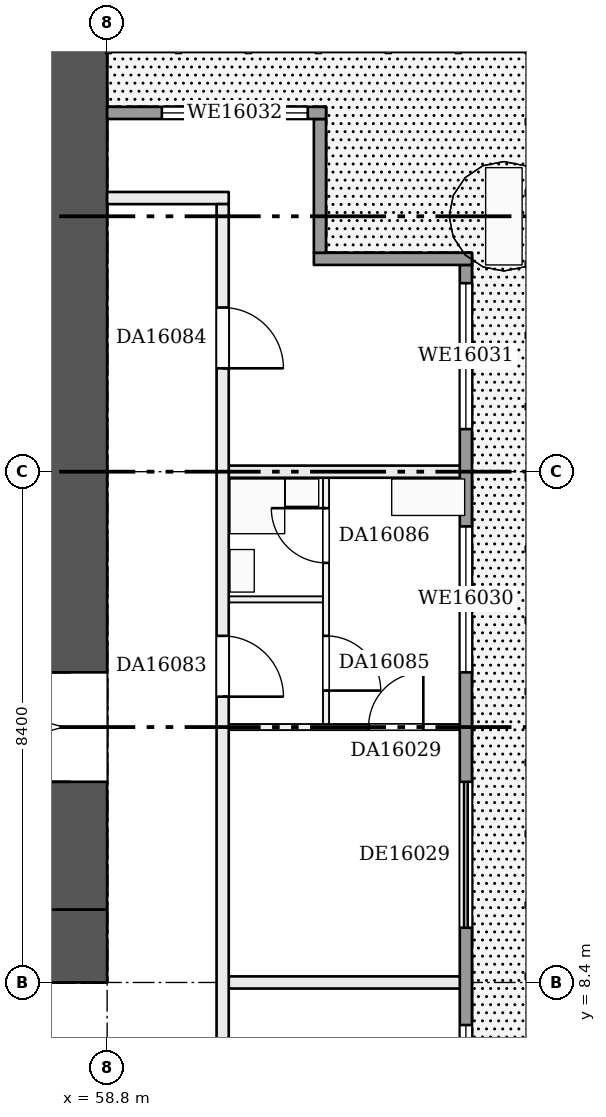
"""IFC4 building model, lengths in metres.
Left out: names, types, materials, properties, quantities, classifications, styles, units other than length and angle.
Written with IfcOpenShell. Run it as: python <this file> out.ifc"""

import sys

from ifc_helpers import new_model, si_unit, direction, frame, frame_2d, origin, place, context, subcontext, project, spatial, rectangle, extrude, element, fill, save


model = new_model("IFC4")
c1 = context("Model", 3, precision=1e-05, world=origin(), true_north=direction((0.0, 1.0)))
c2 = subcontext(c1, "Body", "Model", "MODEL_VIEW")
j1 = project(units=[si_unit("LENGTHUNIT", "METRE"), si_unit("PLANEANGLEUNIT", "RADIAN")], contexts=[c1])
p1 = place(None, origin())
s1 = spatial("IfcSite", under=j1, at=p1, CompositionType="ELEMENT")
p2 = place(p1, origin())
s2 = spatial("IfcBuilding", under=s1, at=p2, CompositionType="ELEMENT")
p3 = place(p2, frame((0.0, 0.0, 67.2)))
s3 = spatial("IfcBuildingStorey", under=s2, at=p3, CompositionType="ELEMENT", Elevation=67.2)
p4 = place(p3, frame((42.0, 9.0, 0.0), z_axis=(0.0, 0.0, 1.0), x_axis=(1.0, 0.0, 0.0)))
e1 = element("IfcWall", 1, at=p4, inside=s3, PredefinedType="SHEAR", context=c2, shape_type="SweptSolid", body=[
    extrude(rectangle(XDim=16.8, YDim=1.2, at=frame_2d((8.4, 0.0))), origin(), (0.0, 0.0, 1.0), 3.22),
])
p5 = place(p4, frame((3.1, 0.0, 0.0)))
e2 = element("IfcOpeningElement", 2, at=p5, cuts=e1, PredefinedType="OPENING", context=c2, shape_type="SweptSolid", body=[
    extrude(rectangle(XDim=1.0, YDim=2.1, at=frame_2d((0.5, 1.05))), frame((0.0, 0.61, 0.0), z_axis=(0.0, -1.0, 0.0), x_axis=(1.0, 0.0, 0.0)), (0.0, 0.0, 1.0), 1.22),
])
p6 = place(p4, frame((12.7, 0.0, 0.0)))
e3 = element("IfcOpeningElement", 3, at=p6, cuts=e1, PredefinedType="OPENING", context=c2, shape_type="SweptSolid", body=[
    extrude(rectangle(XDim=1.0, YDim=2.1, at=frame_2d((0.5, 1.05))), frame((0.0, 0.61, 0.0), z_axis=(0.0, -1.0, 0.0), x_axis=(1.0, 0.0, 0.0)), (0.0, 0.0, 1.0), 1.22),
])
p7 = place(p3, frame((58.2, 9.6, 0.0), z_axis=(0.0, 0.0, 1.0), x_axis=(0.0, 1.0, 0.0)))
e4 = element("IfcWall", 4, at=p7, inside=s3, PredefinedType="SHEAR", context=c2, shape_type="SweptSolid", body=[
    extrude(rectangle(XDim=14.4, YDim=1.2, at=frame_2d((7.2, 0.0))), origin(), (0.0, 0.0, 1.0), 3.22),
])
p8 = place(p7, frame((2.1, 0.0, 0.0)))
e5 = element("IfcOpeningElement", 5, at=p8, cuts=e4, PredefinedType="OPENING", context=c2, shape_type="SweptSolid", body=[
    extrude(rectangle(XDim=1.8, YDim=2.1, at=frame_2d((0.9, 1.05))), frame((0.0, 0.61, 0.0), z_axis=(0.0, -1.0, 0.0), x_axis=(1.0, 0.0, 0.0)), (0.0, 0.0, 1.0), 1.22),
])
p9 = place(p3, frame((60.8, 8.4, 0.0), z_axis=(0.0, 0.0, 1.0), x_axis=(1.0, 0.0, 0.0)))
e6 = element("IfcWall", 6, at=p9, inside=s3, PredefinedType="PARTITIONING", context=c2, shape_type="SweptSolid", body=[
    extrude(rectangle(XDim=3.9, YDim=0.2, at=frame_2d((1.95, 0.0))), origin(), (0.0, 0.0, 1.0), 3.22),
])
p10 = place(p3, frame((60.8, 12.6, 0.0), z_axis=(0.0, 0.0, 1.0), x_axis=(1.0, 0.0, 0.0)))
e7 = element("IfcWall", 7, at=p10, inside=s3, PredefinedType="PARTITIONING", context=c2, shape_type="SweptSolid", body=[
    extrude(rectangle(XDim=3.9, YDim=0.1, at=frame_2d((1.95, 0.0))), origin(), (0.0, 0.0, 1.0), 3.22),
])
p11 = place(p10, frame((2.3, 0.0, 0.0)))
e8 = element("IfcOpeningElement", 8, at=p11, cuts=e7, PredefinedType="OPENING", context=c2, shape_type="SweptSolid", body=[
    extrude(rectangle(XDim=0.9, YDim=2.1, at=frame_2d((0.45, 1.05))), frame((0.0, 0.06, 0.0), z_axis=(0.0, -1.0, 0.0), x_axis=(1.0, 0.0, 0.0)), (0.0, 0.0, 1.0), 0.12),
])
p12 = place(p3, frame((60.8, 14.7, 0.0), z_axis=(0.0, 0.0, 1.0), x_axis=(1.0, 0.0, 0.0)))
e9 = element("IfcWall", 9, at=p12, inside=s3, PredefinedType="PARTITIONING", context=c2, shape_type="SweptSolid", body=[
    extrude(rectangle(XDim=1.55, YDim=0.1, at=frame_2d((0.775, 0.0))), origin(), (0.0, 0.0, 1.0), 3.22),
])
p13 = place(p3, frame((60.8, 16.8, 0.0), z_axis=(0.0, 0.0, 1.0), x_axis=(1.0, 0.0, 0.0)))
e10 = element("IfcWall", 10, at=p13, inside=s3, PredefinedType="PARTITIONING", context=c2, shape_type="SweptSolid", body=[
    extrude(rectangle(XDim=3.9, YDim=0.2, at=frame_2d((1.95, 0.0))), origin(), (0.0, 0.0, 1.0), 3.22),
])
p14 = place(p3, frame((58.8, 21.3, 0.0), z_axis=(0.0, 0.0, 1.0), x_axis=(1.0, 0.0, 0.0)))
e11 = element("IfcWall", 11, at=p14, inside=s3, PredefinedType="PARTITIONING", context=c2, shape_type="SweptSolid", body=[
    extrude(rectangle(XDim=2.0, YDim=0.2, at=frame_2d((1.0, 0.0))), origin(), (0.0, 0.0, 1.0), 3.22),
])
p15 = place(p3, frame((60.7, 6.6, 0.0), z_axis=(0.0, 0.0, 1.0), x_axis=(0.0, 1.0, 0.0)))
e12 = element("IfcWall", 12, at=p15, inside=s3, PredefinedType="PARTITIONING", context=c2, shape_type="SweptSolid", body=[
    extrude(rectangle(XDim=14.6, YDim=0.2, at=frame_2d((7.3, 0.0))), origin(), (0.0, 0.0, 1.0), 3.22),
])
p16 = place(p15, frame((6.5, 0.0, 0.0)))
e13 = element("IfcOpeningElement", 13, at=p16, cuts=e12, PredefinedType="OPENING", context=c2, shape_type="SweptSolid", body=[
    extrude(rectangle(XDim=1.0, YDim=2.1, at=frame_2d((0.5, 1.05))), frame((0.0, 0.11, 0.0), z_axis=(0.0, -1.0, 0.0), x_axis=(1.0, 0.0, 0.0)), (0.0, 0.0, 1.0), 0.22),
])
p17 = place(p15, frame((11.9, 0.0, 0.0)))
e14 = element("IfcOpeningElement", 14, at=p17, cuts=e12, PredefinedType="OPENING", context=c2, shape_type="SweptSolid", body=[
    extrude(rectangle(XDim=1.0, YDim=2.1, at=frame_2d((0.5, 1.05))), frame((0.0, 0.11, 0.0), z_axis=(0.0, -1.0, 0.0), x_axis=(1.0, 0.0, 0.0)), (0.0, 0.0, 1.0), 0.22),
])
p18 = place(p3, frame((62.4, 12.65, 0.0), z_axis=(0.0, 0.0, 1.0), x_axis=(0.0, 1.0, 0.0)))
e15 = element("IfcWall", 15, at=p18, inside=s3, PredefinedType="PARTITIONING", context=c2, shape_type="SweptSolid", body=[
    extrude(rectangle(XDim=4.05, YDim=0.1, at=frame_2d((2.025, 0.0))), origin(), (0.0, 0.0, 1.0), 3.22),
])
p19 = place(p18, frame((0.55, 0.0, 0.0)))
e16 = element("IfcOpeningElement", 16, at=p19, cuts=e15, PredefinedType="OPENING", context=c2, shape_type="SweptSolid", body=[
    extrude(rectangle(XDim=0.9, YDim=2.1, at=frame_2d((0.45, 1.05))), frame((0.0, 0.06, 0.0), z_axis=(0.0, -1.0, 0.0), x_axis=(1.0, 0.0, 0.0)), (0.0, 0.0, 1.0), 0.12),
])
p20 = place(p18, frame((2.65, 0.0, 0.0)))
e17 = element("IfcOpeningElement", 17, at=p20, cuts=e15, PredefinedType="OPENING", context=c2, shape_type="SweptSolid", body=[
    extrude(rectangle(XDim=0.9, YDim=2.1, at=frame_2d((0.45, 1.05))), frame((0.0, 0.06, 0.0), z_axis=(0.0, -1.0, 0.0), x_axis=(1.0, 0.0, 0.0)), (0.0, 0.0, 1.0), 0.12),
])
p21 = place(p3, frame((64.7, 5.0, 0.0), z_axis=(0.0, 0.0, 1.0), x_axis=(0.0, 1.0, 0.0)))
e18 = element("IfcWall", 18, at=p21, inside=s3, PredefinedType="SOLIDWALL", context=c2, shape_type="SweptSolid", body=[
    extrude(rectangle(XDim=15.2, YDim=0.2, at=frame_2d((7.6, 0.0))), origin(), (0.0, 0.0, 1.0), 3.22),
])
p22 = place(p21, frame((0.3, 0.0, 0.9)))
e19 = element("IfcOpeningElement", 19, at=p22, cuts=e18, PredefinedType="OPENING", context=c2, shape_type="SweptSolid", body=[
    extrude(rectangle(XDim=2.4, YDim=1.5, at=frame_2d((1.2, 0.75))), frame((0.0, 0.11, 0.0), z_axis=(0.0, -1.0, 0.0), x_axis=(1.0, 0.0, 0.0)), (0.0, 0.0, 1.0), 0.22),
])
p23 = place(p21, frame((4.3, 0.0, 0.0)))
e20 = element("IfcOpeningElement", 20, at=p23, cuts=e18, PredefinedType="OPENING", context=c2, shape_type="SweptSolid", body=[
    extrude(rectangle(XDim=2.4, YDim=2.2, at=frame_2d((1.2, 1.1))), frame((0.0, 0.11, 0.0), z_axis=(0.0, -1.0, 0.0), x_axis=(1.0, 0.0, 0.0)), (0.0, 0.0, 1.0), 0.22),
])
p24 = place(p21, frame((8.5, 0.0, 0.9)))
e21 = element("IfcOpeningElement", 21, at=p24, cuts=e18, PredefinedType="OPENING", context=c2, shape_type="SweptSolid", body=[
    extrude(rectangle(XDim=2.4, YDim=1.5, at=frame_2d((1.2, 0.75))), frame((0.0, 0.11, 0.0), z_axis=(0.0, -1.0, 0.0), x_axis=(1.0, 0.0, 0.0)), (0.0, 0.0, 1.0), 0.22),
])
p25 = place(p21, frame((12.5, 0.0, 0.9)))
e22 = element("IfcOpeningElement", 22, at=p25, cuts=e18, PredefinedType="OPENING", context=c2, shape_type="SweptSolid", body=[
    extrude(rectangle(XDim=2.4, YDim=1.5, at=frame_2d((1.2, 0.75))), frame((0.0, 0.11, 0.0), z_axis=(0.0, -1.0, 0.0), x_axis=(1.0, 0.0, 0.0)), (0.0, 0.0, 1.0), 0.22),
])
p26 = place(p3, frame((64.8, 20.3, 0.0), z_axis=(0.0, 0.0, 1.0), x_axis=(-1.0, 0.0, 0.0)))
e23 = element("IfcWall", 23, at=p26, inside=s3, PredefinedType="SOLIDWALL", context=c2, shape_type="SweptSolid", body=[
    extrude(rectangle(XDim=2.6, YDim=0.2, at=frame_2d((1.3, 0.0))), origin(), (0.0, 0.0, 1.0), 3.22),
])
p27 = place(p3, frame((62.3, 20.4, 0.0), z_axis=(0.0, 0.0, 1.0), x_axis=(0.0, 1.0, 0.0)))
e24 = element("IfcWall", 24, at=p27, inside=s3, PredefinedType="SOLIDWALL", context=c2, shape_type="SweptSolid", body=[
    extrude(rectangle(XDim=2.2, YDim=0.2, at=frame_2d((1.1, 0.0))), origin(), (0.0, 0.0, 1.0), 3.22),
])
p28 = place(p3, frame((62.4, 22.7, 0.0), z_axis=(0.0, 0.0, 1.0), x_axis=(-1.0, 0.0, 0.0)))
e25 = element("IfcWall", 25, at=p28, inside=s3, PredefinedType="SOLIDWALL", context=c2, shape_type="SweptSolid", body=[
    extrude(rectangle(XDim=3.6, YDim=0.2, at=frame_2d((1.8, 0.0))), origin(), (0.0, 0.0, 1.0), 3.22),
])
p29 = place(p28, frame((0.3, 0.0, 0.9)))
e26 = element("IfcOpeningElement", 26, at=p29, cuts=e25, PredefinedType="OPENING", context=c2, shape_type="SweptSolid", body=[
    extrude(rectangle(XDim=2.4, YDim=1.5, at=frame_2d((1.2, 0.75))), frame((0.0, 0.11, 0.0), z_axis=(0.0, -1.0, 0.0), x_axis=(1.0, 0.0, 0.0)), (0.0, 0.0, 1.0), 0.22),
])
p30 = place(p8, origin())
e27 = element("IfcDoor", 27, at=p30, inside=s3, OperationType="DOUBLE_DOOR_SINGLE_SWING", PredefinedType="DOOR", context=c2, shape_type="SweptSolid", body=[
    extrude(rectangle(XDim=1.8, YDim=2.1, at=frame_2d((0.9, 1.05))), frame((0.0, 0.025, 0.0), z_axis=(0.0, -1.0, 0.0), x_axis=(1.0, 0.0, 0.0)), (0.0, 0.0, 1.0), 0.05),
])
fill(e5, e27)
p31 = place(p11, origin())
e28 = element("IfcDoor", 28, at=p31, inside=s3, OperationType="SINGLE_SWING_RIGHT", PredefinedType="DOOR", context=c2, shape_type="SweptSolid", body=[
    extrude(rectangle(XDim=0.9, YDim=2.1, at=frame_2d((0.45, 1.05))), frame((0.0, 0.025, 0.0), z_axis=(0.0, -1.0, 0.0), x_axis=(1.0, 0.0, 0.0)), (0.0, 0.0, 1.0), 0.05),
])
fill(e8, e28)
p32 = place(p16, frame((1.0, 0.0, 0.0), z_axis=(0.0, 0.0, 1.0), x_axis=(-1.0, 0.0, 0.0)))
e29 = element("IfcDoor", 29, at=p32, inside=s3, OperationType="SINGLE_SWING_RIGHT", PredefinedType="DOOR", context=c2, shape_type="SweptSolid", body=[
    extrude(rectangle(XDim=1.0, YDim=2.1, at=frame_2d((0.5, 1.05))), frame((0.0, 0.025, 0.0), z_axis=(0.0, -1.0, 0.0), x_axis=(1.0, 0.0, 0.0)), (0.0, 0.0, 1.0), 0.05),
])
fill(e13, e29)
p33 = place(p17, frame((1.0, 0.0, 0.0), z_axis=(0.0, 0.0, 1.0), x_axis=(-1.0, 0.0, 0.0)))
e30 = element("IfcDoor", 30, at=p33, inside=s3, OperationType="SINGLE_SWING_RIGHT", PredefinedType="DOOR", context=c2, shape_type="SweptSolid", body=[
    extrude(rectangle(XDim=1.0, YDim=2.1, at=frame_2d((0.5, 1.05))), frame((0.0, 0.025, 0.0), z_axis=(0.0, -1.0, 0.0), x_axis=(1.0, 0.0, 0.0)), (0.0, 0.0, 1.0), 0.05),
])
fill(e14, e30)
p34 = place(p19, frame((0.9, 0.0, 0.0), z_axis=(0.0, 0.0, 1.0), x_axis=(-1.0, 0.0, 0.0)))
e31 = element("IfcDoor", 31, at=p34, inside=s3, OperationType="SINGLE_SWING_RIGHT", PredefinedType="DOOR", context=c2, shape_type="SweptSolid", body=[
    extrude(rectangle(XDim=0.9, YDim=2.1, at=frame_2d((0.45, 1.05))), frame((0.0, 0.025, 0.0), z_axis=(0.0, -1.0, 0.0), x_axis=(1.0, 0.0, 0.0)), (0.0, 0.0, 1.0), 0.05),
])
fill(e16, e31)
p35 = place(p20, origin())
e32 = element("IfcDoor", 32, at=p35, inside=s3, OperationType="SINGLE_SWING_RIGHT", PredefinedType="DOOR", context=c2, shape_type="SweptSolid", body=[
    extrude(rectangle(XDim=0.9, YDim=2.1, at=frame_2d((0.45, 1.05))), frame((0.0, 0.025, 0.0), z_axis=(0.0, -1.0, 0.0), x_axis=(1.0, 0.0, 0.0)), (0.0, 0.0, 1.0), 0.05),
])
fill(e17, e32)
p36 = place(p22, origin())
e33 = element("IfcWindow", 33, at=p36, inside=s3, PartitioningType="SINGLE_PANEL", PredefinedType="WINDOW", context=c2, shape_type="SweptSolid", body=[
    extrude(rectangle(XDim=2.4, YDim=1.5, at=frame_2d((1.2, 0.75))), frame((0.0, 0.03, 0.0), z_axis=(0.0, -1.0, 0.0), x_axis=(1.0, 0.0, 0.0)), (0.0, 0.0, 1.0), 0.06),
])
fill(e19, e33)
p37 = place(p23, origin())
e34 = element("IfcDoor", 34, at=p37, inside=s3, OperationType="DOUBLE_DOOR_SLIDING", PredefinedType="DOOR", context=c2, shape_type="SweptSolid", body=[
    extrude(rectangle(XDim=2.4, YDim=2.2, at=frame_2d((1.2, 1.1))), frame((0.0, 0.025, 0.0), z_axis=(0.0, -1.0, 0.0), x_axis=(1.0, 0.0, 0.0)), (0.0, 0.0, 1.0), 0.05),
])
fill(e20, e34)
p38 = place(p24, origin())
e35 = element("IfcWindow", 35, at=p38, inside=s3, PartitioningType="SINGLE_PANEL", PredefinedType="WINDOW", context=c2, shape_type="SweptSolid", body=[
    extrude(rectangle(XDim=2.4, YDim=1.5, at=frame_2d((1.2, 0.75))), frame((0.0, 0.03, 0.0), z_axis=(0.0, -1.0, 0.0), x_axis=(1.0, 0.0, 0.0)), (0.0, 0.0, 1.0), 0.06),
])
fill(e21, e35)
p39 = place(p25, origin())
e36 = element("IfcWindow", 36, at=p39, inside=s3, PartitioningType="SINGLE_PANEL", PredefinedType="WINDOW", context=c2, shape_type="SweptSolid", body=[
    extrude(rectangle(XDim=2.4, YDim=1.5, at=frame_2d((1.2, 0.75))), frame((0.0, 0.03, 0.0), z_axis=(0.0, -1.0, 0.0), x_axis=(1.0, 0.0, 0.0)), (0.0, 0.0, 1.0), 0.06),
])
fill(e22, e36)
p40 = place(p29, origin())
e37 = element("IfcWindow", 37, at=p40, inside=s3, PartitioningType="SINGLE_PANEL", PredefinedType="WINDOW", context=c2, shape_type="SweptSolid", body=[
    extrude(rectangle(XDim=2.4, YDim=1.5, at=frame_2d((1.2, 0.75))), frame((0.0, 0.03, 0.0), z_axis=(0.0, -1.0, 0.0), x_axis=(1.0, 0.0, 0.0)), (0.0, 0.0, 1.0), 0.06),
])
fill(e26, e37)
save(model, sys.argv[1])
